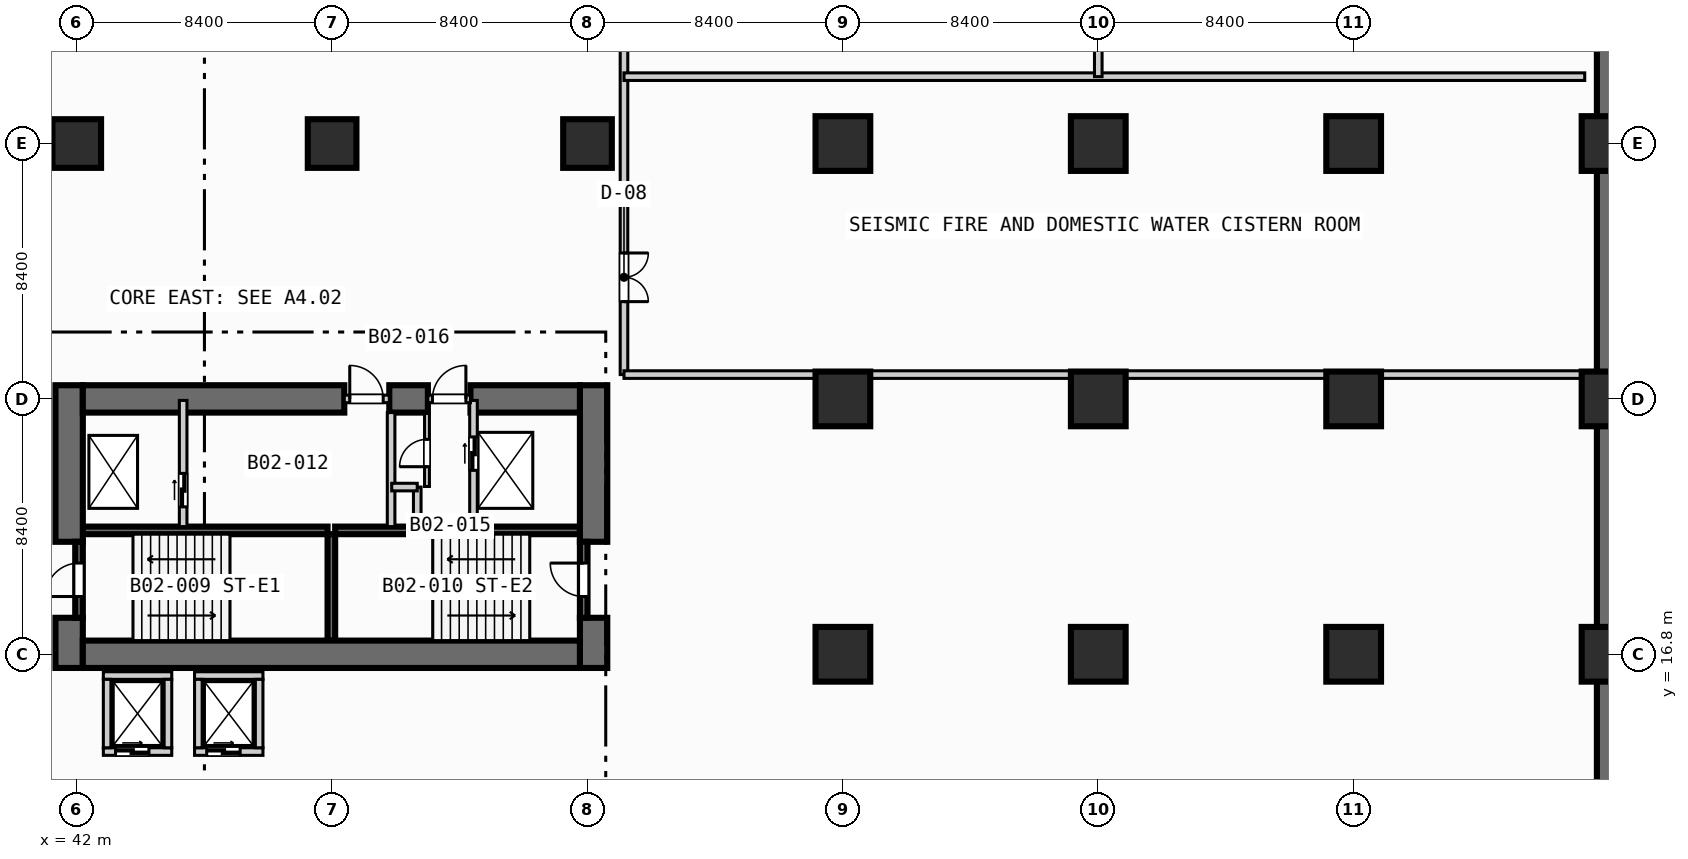
"""IFC4 building model, lengths in metres.
Left out: names, types, materials, properties, quantities, classifications, styles, units other than length and angle.
Written with IfcOpenShell. Run it as: python <this file> out.ifc"""

import sys

from ifc_helpers import new_model, si_unit, direction, frame, frame_2d, origin, origin_2d, place, context, subcontext, project, spatial, rectangle, extrude, element, fill, save


model = new_model("IFC4")
c1 = context("Model", 3, precision=1e-05, world=origin(), true_north=direction((0.0, 1.0)))
c2 = subcontext(c1, "Body", "Model", "MODEL_VIEW")
j1 = project(units=[si_unit("LENGTHUNIT", "METRE"), si_unit("PLANEANGLEUNIT", "RADIAN")], contexts=[c1])
p1 = place(None, origin())
s1 = spatial("IfcSite", under=j1, at=p1, CompositionType="ELEMENT")
p2 = place(p1, origin())
s2 = spatial("IfcBuilding", under=s1, at=p2, CompositionType="ELEMENT")
p3 = place(p2, frame((0.0, 0.0, -8.4)))
s3 = spatial("IfcBuildingStorey", under=s2, at=p3, CompositionType="ELEMENT", Elevation=-8.4)
p4 = place(p3, frame((92.4, 0.4, 0.0), z_axis=(0.0, 0.0, 1.0), x_axis=(0.0, 1.0, 0.0)))
e1 = element("IfcWall", 1, at=p4, inside=s3, PredefinedType="USERDEFINED", context=c2, shape_type="SweptSolid", body=[
    extrude(rectangle(XDim=91.6, YDim=0.8, at=frame_2d((45.8, 0.0))), origin(), (0.0, 0.0, 1.0), 3.85),
])
for number, where, z_axis, x_axis in (
    (2, (42.2, 20.875, 0.0), (0.0, 0.0, 1.0), (1.0, 0.0, 0.0)),
    (3, (50.5, 20.875, 0.0), (0.0, 0.0, 1.0), (1.0, 0.0, 0.0)),
):
    element("IfcWall", number, at=place(p3, frame(where, z_axis=z_axis, x_axis=x_axis)), inside=s3, PredefinedType="SOLIDWALL", context=c2, shape_type="SweptSolid", body=[
        extrude(rectangle(XDim=8.05, YDim=0.25, at=frame_2d((4.025, 0.0))), origin(), (0.0, 0.0, 1.0), 3.85),
    ])
p5 = place(p3, frame((50.375, 17.25, 0.0), z_axis=(0.0, 0.0, 1.0), x_axis=(0.0, 1.0, 0.0)))
e4 = element("IfcWall", 4, at=p5, inside=s3, PredefinedType="SOLIDWALL", context=c2, shape_type="SweptSolid", body=[
    extrude(rectangle(XDim=3.5, YDim=0.25, at=frame_2d((1.75, 0.0))), origin(), (0.0, 0.0, 1.0), 3.85),
])
p6 = place(p3, frame((41.75, 16.35, 0.0), z_axis=(0.0, 0.0, 1.0), x_axis=(0.0, 1.0, 0.0)))
e5 = element("IfcWall", 5, at=p6, inside=s3, PredefinedType="SHEAR", context=c2, shape_type="SweptSolid", body=[
    extrude(rectangle(XDim=1.65, YDim=0.9, at=frame_2d((0.825, 0.0))), origin(), (0.0, 0.0, 1.0), 3.85),
])
p7 = place(p3, frame((41.75, 20.5, 0.0), z_axis=(0.0, 0.0, 1.0), x_axis=(0.0, 1.0, 0.0)))
e6 = element("IfcWall", 6, at=p7, inside=s3, PredefinedType="SHEAR", context=c2, shape_type="SweptSolid", body=[
    extrude(rectangle(XDim=5.15, YDim=0.9, at=frame_2d((2.575, 0.0))), origin(), (0.0, 0.0, 1.0), 3.85),
])
p8 = place(p3, frame((59.0, 16.35, 0.0), z_axis=(0.0, 0.0, 1.0), x_axis=(0.0, 1.0, 0.0)))
e7 = element("IfcWall", 7, at=p8, inside=s3, PredefinedType="SHEAR", context=c2, shape_type="SweptSolid", body=[
    extrude(rectangle(XDim=1.65, YDim=0.9, at=frame_2d((0.825, 0.0))), origin(), (0.0, 0.0, 1.0), 3.85),
])
p9 = place(p3, frame((59.0, 20.5, 0.0), z_axis=(0.0, 0.0, 1.0), x_axis=(0.0, 1.0, 0.0)))
e8 = element("IfcWall", 8, at=p9, inside=s3, PredefinedType="SHEAR", context=c2, shape_type="SweptSolid", body=[
    extrude(rectangle(XDim=5.15, YDim=0.9, at=frame_2d((2.575, 0.0))), origin(), (0.0, 0.0, 1.0), 3.85),
])
p10 = place(p3, frame((42.2, 16.8, 0.0), z_axis=(0.0, 0.0, 1.0), x_axis=(1.0, 0.0, 0.0)))
e9 = element("IfcWall", 9, at=p10, inside=s3, PredefinedType="SHEAR", context=c2, shape_type="SweptSolid", body=[
    extrude(rectangle(XDim=16.35, YDim=0.9, at=frame_2d((8.175, 0.0))), origin(), (0.0, 0.0, 1.0), 3.85),
])
p11 = place(p3, frame((42.2, 25.2, 0.0), z_axis=(0.0, 0.0, 1.0), x_axis=(1.0, 0.0, 0.0)))
e10 = element("IfcWall", 10, at=p11, inside=s3, PredefinedType="SHEAR", context=c2, shape_type="SweptSolid", body=[
    extrude(rectangle(XDim=8.6, YDim=0.9, at=frame_2d((4.3, 0.0))), origin(), (0.0, 0.0, 1.0), 3.85),
])
p12 = place(p3, frame((52.28, 25.2, 0.0), z_axis=(0.0, 0.0, 1.0), x_axis=(1.0, 0.0, 0.0)))
e11 = element("IfcWall", 11, at=p12, inside=s3, PredefinedType="SHEAR", context=c2, shape_type="SweptSolid", body=[
    extrude(rectangle(XDim=1.27, YDim=0.9, at=frame_2d((0.635, 0.0))), origin(), (0.0, 0.0, 1.0), 3.85),
])
p13 = place(p3, frame((54.95, 25.2, 0.0), z_axis=(0.0, 0.0, 1.0), x_axis=(1.0, 0.0, 0.0)))
e12 = element("IfcWall", 12, at=p13, inside=s3, PredefinedType="SHEAR", context=c2, shape_type="SweptSolid", body=[
    extrude(rectangle(XDim=3.6, YDim=0.9, at=frame_2d((1.8, 0.0))), origin(), (0.0, 0.0, 1.0), 3.85),
])
for number, where, z_axis, x_axis in (
    (13, (42.0, 33.6, 0.0), (0.0, 0.0, 1.0), (1.0, 0.0, 0.0)),
    (14, (50.4, 33.6, 0.0), (0.0, 0.0, 1.0), (1.0, 0.0, 0.0)),
    (15, (58.8, 33.6, 0.0), (0.0, 0.0, 1.0), (1.0, 0.0, 0.0)),
):
    element("IfcColumn", number, at=place(p3, frame(where, z_axis=z_axis, x_axis=x_axis)), inside=s3, PredefinedType="COLUMN", context=c2, shape_type="SweptSolid", body=[
        extrude(rectangle(XDim=1.6, YDim=1.6, at=origin_2d()), origin(), (0.0, 0.0, 1.0), 4.2),
    ])
for number, where, z_axis, x_axis in (
    (16, (67.2, 16.8, 0.0), (0.0, 0.0, 1.0), (1.0, 0.0, 0.0)),
    (17, (67.2, 25.2, 0.0), (0.0, 0.0, 1.0), (1.0, 0.0, 0.0)),
    (18, (67.2, 33.6, 0.0), (0.0, 0.0, 1.0), (1.0, 0.0, 0.0)),
    (19, (75.6, 16.8, 0.0), (0.0, 0.0, 1.0), (1.0, 0.0, 0.0)),
    (20, (75.6, 25.2, 0.0), (0.0, 0.0, 1.0), (1.0, 0.0, 0.0)),
    (21, (75.6, 33.6, 0.0), (0.0, 0.0, 1.0), (1.0, 0.0, 0.0)),
    (22, (84.0, 16.8, 0.0), (0.0, 0.0, 1.0), (1.0, 0.0, 0.0)),
    (23, (84.0, 25.2, 0.0), (0.0, 0.0, 1.0), (1.0, 0.0, 0.0)),
    (24, (84.0, 33.6, 0.0), (0.0, 0.0, 1.0), (1.0, 0.0, 0.0)),
    (25, (92.4, 16.8, 0.0), (0.0, 0.0, 1.0), (1.0, 0.0, 0.0)),
    (26, (92.4, 25.2, 0.0), (0.0, 0.0, 1.0), (1.0, 0.0, 0.0)),
    (27, (92.4, 33.6, 0.0), (0.0, 0.0, 1.0), (1.0, 0.0, 0.0)),
):
    element("IfcColumn", number, at=place(p3, frame(where, z_axis=z_axis, x_axis=x_axis)), inside=s3, PredefinedType="COLUMN", context=c2, shape_type="SweptSolid", body=[
        extrude(rectangle(XDim=1.8, YDim=1.8, at=origin_2d()), origin(), (0.0, 0.0, 1.0), 4.2),
    ])
p14 = place(p3, frame((42.075, 18.0, 0.0), z_axis=(0.0, 0.0, 1.0), x_axis=(0.0, 1.0, 0.0)))
e28 = element("IfcWall", 28, at=p14, inside=s3, PredefinedType="SOLIDWALL", context=c2, shape_type="SweptSolid", body=[
    extrude(rectangle(XDim=2.5, YDim=0.25, at=frame_2d((1.25, 0.0))), origin(), (0.0, 0.0, 1.0), 3.85),
])
p15 = place(p14, frame((0.7, 0.0, 0.0)))
e29 = element("IfcOpeningElement", 29, at=p15, cuts=e28, PredefinedType="OPENING", context=c2, shape_type="SweptSolid", body=[
    extrude(rectangle(XDim=1.1, YDim=2.15, at=frame_2d((0.55, 1.075))), frame((0.0, 0.135, 0.0), z_axis=(0.0, -1.0, 0.0), x_axis=(1.0, 0.0, 0.0)), (0.0, 0.0, 1.0), 0.27),
])
p16 = place(p3, frame((58.675, 18.0, 0.0), z_axis=(0.0, 0.0, 1.0), x_axis=(0.0, 1.0, 0.0)))
e30 = element("IfcWall", 30, at=p16, inside=s3, PredefinedType="SOLIDWALL", context=c2, shape_type="SweptSolid", body=[
    extrude(rectangle(XDim=2.5, YDim=0.25, at=frame_2d((1.25, 0.0))), origin(), (0.0, 0.0, 1.0), 3.85),
])
p17 = place(p16, frame((0.7, 0.0, 0.0)))
e31 = element("IfcOpeningElement", 31, at=p17, cuts=e30, PredefinedType="OPENING", context=c2, shape_type="SweptSolid", body=[
    extrude(rectangle(XDim=1.1, YDim=2.15, at=frame_2d((0.55, 1.075))), frame((0.0, 0.135, 0.0), z_axis=(0.0, -1.0, 0.0), x_axis=(1.0, 0.0, 0.0)), (0.0, 0.0, 1.0), 0.27),
])
p18 = place(p3, frame((45.5, 21.0, 0.0), z_axis=(0.0, 0.0, 1.0), x_axis=(0.0, 1.0, 0.0)))
e32 = element("IfcWall", 32, at=p18, inside=s3, PredefinedType="SOLIDWALL", context=c2, shape_type="SweptSolid", body=[
    extrude(rectangle(XDim=4.15, YDim=0.25, at=frame_2d((2.075, 0.0))), origin(), (0.0, 0.0, 1.0), 3.85),
])
p19 = place(p18, frame((0.65, 0.0, 0.0)))
e33 = element("IfcOpeningElement", 33, at=p19, cuts=e32, PredefinedType="OPENING", context=c2, shape_type="SweptSolid", body=[
    extrude(rectangle(XDim=1.1, YDim=2.15, at=frame_2d((0.55, 1.075))), frame((0.0, 0.135, 0.0), z_axis=(0.0, -1.0, 0.0), x_axis=(1.0, 0.0, 0.0)), (0.0, 0.0, 1.0), 0.27),
])
p20 = place(p3, frame((50.8, 25.2, 0.0), z_axis=(0.0, 0.0, 1.0), x_axis=(1.0, 0.0, 0.0)))
e34 = element("IfcWall", 34, at=p20, inside=s3, PredefinedType="SOLIDWALL", context=c2, shape_type="SweptSolid", body=[
    extrude(rectangle(XDim=1.48, YDim=0.25, at=frame_2d((0.74, 0.0))), origin(), (0.0, 0.0, 1.0), 3.85),
])
p21 = place(p20, frame((0.18, 0.0, 0.0)))
e35 = element("IfcOpeningElement", 35, at=p21, cuts=e34, PredefinedType="OPENING", context=c2, shape_type="SweptSolid", body=[
    extrude(rectangle(XDim=1.1, YDim=2.15, at=frame_2d((0.55, 1.075))), frame((0.0, 0.135, 0.0), z_axis=(0.0, -1.0, 0.0), x_axis=(1.0, 0.0, 0.0)), (0.0, 0.0, 1.0), 0.27),
])
p22 = place(p3, frame((52.34, 21.0, 0.0), z_axis=(0.0, 0.0, 1.0), x_axis=(0.0, 1.0, 0.0)))
e36 = element("IfcWall", 36, at=p22, inside=s3, PredefinedType="SOLIDWALL", context=c2, shape_type="SweptSolid", body=[
    extrude(rectangle(XDim=3.75, YDim=0.25, at=frame_2d((1.875, 0.0))), origin(), (0.0, 0.0, 1.0), 3.85),
])
p23 = place(p3, frame((55.05, 21.0, 0.0), z_axis=(0.0, 0.0, 1.0), x_axis=(0.0, 1.0, 0.0)))
e37 = element("IfcWall", 37, at=p23, inside=s3, PredefinedType="SOLIDWALL", context=c2, shape_type="SweptSolid", body=[
    extrude(rectangle(XDim=4.15, YDim=0.25, at=frame_2d((2.075, 0.0))), origin(), (0.0, 0.0, 1.0), 3.85),
])
p24 = place(p23, frame((1.85, 0.0, 0.0)))
e38 = element("IfcOpeningElement", 38, at=p24, cuts=e37, PredefinedType="OPENING", context=c2, shape_type="SweptSolid", body=[
    extrude(rectangle(XDim=1.1, YDim=2.15, at=frame_2d((0.55, 1.075))), frame((0.0, 0.135, 0.0), z_axis=(0.0, -1.0, 0.0), x_axis=(1.0, 0.0, 0.0)), (0.0, 0.0, 1.0), 0.27),
])
p25 = place(p3, frame((53.55, 25.2, 0.0), z_axis=(0.0, 0.0, 1.0), x_axis=(1.0, 0.0, 0.0)))
e39 = element("IfcWall", 39, at=p25, inside=s3, PredefinedType="SOLIDWALL", context=c2, shape_type="SweptSolid", body=[
    extrude(rectangle(XDim=1.4, YDim=0.25, at=frame_2d((0.7, 0.0))), origin(), (0.0, 0.0, 1.0), 3.85),
])
p26 = place(p25, frame((0.15, 0.0, 0.0)))
e40 = element("IfcOpeningElement", 40, at=p26, cuts=e39, PredefinedType="OPENING", context=c2, shape_type="SweptSolid", body=[
    extrude(rectangle(XDim=1.1, YDim=2.15, at=frame_2d((0.55, 1.075))), frame((0.0, 0.135, 0.0), z_axis=(0.0, -1.0, 0.0), x_axis=(1.0, 0.0, 0.0)), (0.0, 0.0, 1.0), 0.27),
])
p27 = place(p3, frame((53.2, 21.0, 0.0), z_axis=(0.0, 0.0, 1.0), x_axis=(0.0, 1.0, 0.0)))
e41 = element("IfcWall", 41, at=p27, inside=s3, PredefinedType="SOLIDWALL", context=c2, shape_type="SweptSolid", body=[
    extrude(rectangle(XDim=1.3, YDim=0.25, at=frame_2d((0.65, 0.0))), origin(), (0.0, 0.0, 1.0), 3.85),
])
p28 = place(p3, frame((52.36, 22.3, 0.0), z_axis=(0.0, 0.0, 1.0), x_axis=(1.0, 0.0, 0.0)))
e42 = element("IfcWall", 42, at=p28, inside=s3, PredefinedType="SOLIDWALL", context=c2, shape_type="SweptSolid", body=[
    extrude(rectangle(XDim=0.84, YDim=0.25, at=frame_2d((0.42, 0.0))), origin(), (0.0, 0.0, 1.0), 3.85),
])
p29 = place(p3, frame((53.52, 22.32, 0.0), z_axis=(0.0, 0.0, 1.0), x_axis=(0.0, 1.0, 0.0)))
e43 = element("IfcWall", 43, at=p29, inside=s3, PredefinedType="PARTITIONING", context=c2, shape_type="SweptSolid", body=[
    extrude(rectangle(XDim=2.4, YDim=0.16, at=frame_2d((1.2, 0.0))), origin(), (0.0, 0.0, 1.0), 3.85),
])
p30 = place(p29, frame((0.65, 0.0, 0.0)))
e44 = element("IfcOpeningElement", 44, at=p30, cuts=e43, PredefinedType="OPENING", context=c2, shape_type="SweptSolid", body=[
    extrude(rectangle(XDim=0.9, YDim=2.1, at=frame_2d((0.45, 1.05))), frame((0.0, 0.09, 0.0), z_axis=(0.0, -1.0, 0.0), x_axis=(1.0, 0.0, 0.0)), (0.0, 0.0, 1.0), 0.18),
])
p31 = place(p3, frame((42.875, 13.6, 0.0), z_axis=(0.0, 0.0, 1.0), x_axis=(1.0, 0.0, 0.0)))
e45 = element("IfcWall", 45, at=p31, inside=s3, PredefinedType="SOLIDWALL", context=c2, shape_type="SweptSolid", body=[
    extrude(rectangle(XDim=2.25, YDim=0.25, at=frame_2d((1.125, 0.0))), origin(), (0.0, 0.0, 1.0), 3.85),
])
p32 = place(p31, frame((0.4, 0.0, 0.0)))
e46 = element("IfcOpeningElement", 46, at=p32, cuts=e45, PredefinedType="OPENING", context=c2, shape_type="SweptSolid", body=[
    extrude(rectangle(XDim=1.1, YDim=2.15, at=frame_2d((0.55, 1.075))), frame((0.0, 0.135, 0.0), z_axis=(0.0, -1.0, 0.0), x_axis=(1.0, 0.0, 0.0)), (0.0, 0.0, 1.0), 0.27),
])
for number, where, z_axis, x_axis in (
    (47, (42.875, 16.1, 0.0), (0.0, 0.0, 1.0), (1.0, 0.0, 0.0)),
    (48, (43.0, 13.725, 0.0), (0.0, 0.0, 1.0), (0.0, 1.0, 0.0)),
    (49, (45.0, 13.725, 0.0), (0.0, 0.0, 1.0), (0.0, 1.0, 0.0)),
):
    element("IfcWall", number, at=place(p3, frame(where, z_axis=z_axis, x_axis=x_axis)), inside=s3, PredefinedType="SOLIDWALL", context=c2, shape_type="SweptSolid", body=[
        extrude(rectangle(XDim=2.25, YDim=0.25, at=frame_2d((1.125, 0.0))), origin(), (0.0, 0.0, 1.0), 3.85),
    ])
p33 = place(p3, frame((45.875, 13.6, 0.0), z_axis=(0.0, 0.0, 1.0), x_axis=(1.0, 0.0, 0.0)))
e50 = element("IfcWall", 50, at=p33, inside=s3, PredefinedType="SOLIDWALL", context=c2, shape_type="SweptSolid", body=[
    extrude(rectangle(XDim=2.25, YDim=0.25, at=frame_2d((1.125, 0.0))), origin(), (0.0, 0.0, 1.0), 3.85),
])
p34 = place(p33, frame((0.4, 0.0, 0.0)))
e51 = element("IfcOpeningElement", 51, at=p34, cuts=e50, PredefinedType="OPENING", context=c2, shape_type="SweptSolid", body=[
    extrude(rectangle(XDim=1.1, YDim=2.15, at=frame_2d((0.55, 1.075))), frame((0.0, 0.135, 0.0), z_axis=(0.0, -1.0, 0.0), x_axis=(1.0, 0.0, 0.0)), (0.0, 0.0, 1.0), 0.27),
])
for number, where, z_axis, x_axis in (
    (52, (45.875, 16.1, 0.0), (0.0, 0.0, 1.0), (1.0, 0.0, 0.0)),
    (53, (46.0, 13.725, 0.0), (0.0, 0.0, 1.0), (0.0, 1.0, 0.0)),
    (54, (48.0, 13.725, 0.0), (0.0, 0.0, 1.0), (0.0, 1.0, 0.0)),
):
    element("IfcWall", number, at=place(p3, frame(where, z_axis=z_axis, x_axis=x_axis)), inside=s3, PredefinedType="SOLIDWALL", context=c2, shape_type="SweptSolid", body=[
        extrude(rectangle(XDim=2.25, YDim=0.25, at=frame_2d((1.125, 0.0))), origin(), (0.0, 0.0, 1.0), 3.85),
    ])
p35 = place(p3, frame((60.0, 26.0, 0.0), z_axis=(0.0, 0.0, 1.0), x_axis=(0.0, 1.0, 0.0)))
e55 = element("IfcWall", 55, at=p35, inside=s3, PredefinedType="SOLIDWALL", context=c2, shape_type="SweptSolid", body=[
    extrude(rectangle(XDim=19.6, YDim=0.25, at=frame_2d((9.8, 0.0))), origin(), (0.0, 0.0, 1.0), 3.85),
])
p36 = place(p35, frame((2.4, 0.0, 0.0)))
e56 = element("IfcOpeningElement", 56, at=p36, cuts=e55, PredefinedType="OPENING", context=c2, shape_type="SweptSolid", body=[
    extrude(rectangle(XDim=1.6, YDim=2.2, at=frame_2d((0.8, 1.1))), frame((0.0, 0.135, 0.0), z_axis=(0.0, -1.0, 0.0), x_axis=(1.0, 0.0, 0.0)), (0.0, 0.0, 1.0), 0.27),
])
p37 = place(p35, frame((17.2, 0.0, 0.0)))
e57 = element("IfcOpeningElement", 57, at=p37, cuts=e55, PredefinedType="OPENING", context=c2, shape_type="SweptSolid", body=[
    extrude(rectangle(XDim=1.6, YDim=2.2, at=frame_2d((0.8, 1.1))), frame((0.0, 0.135, 0.0), z_axis=(0.0, -1.0, 0.0), x_axis=(1.0, 0.0, 0.0)), (0.0, 0.0, 1.0), 0.27),
])
for number, where, z_axis, x_axis in (
    (58, (60.0, 35.8, 0.0), (0.0, 0.0, 1.0), (1.0, 0.0, 0.0)),
    (59, (60.0, 26.0, 0.0), (0.0, 0.0, 1.0), (1.0, 0.0, 0.0)),
):
    element("IfcWall", number, at=place(p3, frame(where, z_axis=z_axis, x_axis=x_axis)), inside=s3, PredefinedType="SOLIDWALL", context=c2, shape_type="SweptSolid", body=[
        extrude(rectangle(XDim=31.6, YDim=0.25, at=frame_2d((15.8, 0.0))), origin(), (0.0, 0.0, 1.0), 3.85),
    ])
p38 = place(p3, frame((75.6, 35.8, 0.0), z_axis=(0.0, 0.0, 1.0), x_axis=(0.0, 1.0, 0.0)))
e60 = element("IfcWall", 60, at=p38, inside=s3, PredefinedType="SOLIDWALL", context=c2, shape_type="SweptSolid", body=[
    extrude(rectangle(XDim=9.8, YDim=0.25, at=frame_2d((4.9, 0.0))), origin(), (0.0, 0.0, 1.0), 3.0),
])
p39 = place(p15, origin())
e61 = element("IfcDoor", 61, at=p39, inside=s3, OperationType="SINGLE_SWING_LEFT", PredefinedType="DOOR", context=c2, shape_type="SweptSolid", body=[
    extrude(rectangle(XDim=1.1, YDim=2.15, at=frame_2d((0.55, 1.075))), frame((0.0, 0.025, 0.0), z_axis=(0.0, -1.0, 0.0), x_axis=(1.0, 0.0, 0.0)), (0.0, 0.0, 1.0), 0.05),
])
fill(e29, e61)
p40 = place(p17, origin())
e62 = element("IfcDoor", 62, at=p40, inside=s3, OperationType="SINGLE_SWING_RIGHT", PredefinedType="DOOR", context=c2, shape_type="SweptSolid", body=[
    extrude(rectangle(XDim=1.1, YDim=2.15, at=frame_2d((0.55, 1.075))), frame((0.0, 0.025, 0.0), z_axis=(0.0, -1.0, 0.0), x_axis=(1.0, 0.0, 0.0)), (0.0, 0.0, 1.0), 0.05),
])
fill(e31, e62)
p41 = place(p19, origin())
e63 = element("IfcDoor", 63, at=p41, inside=s3, OperationType="SLIDING_TO_LEFT", PredefinedType="DOOR", context=c2, shape_type="SweptSolid", body=[
    extrude(rectangle(XDim=1.1, YDim=2.15, at=frame_2d((0.55, 1.075))), frame((0.0, 0.025, 0.0), z_axis=(0.0, -1.0, 0.0), x_axis=(1.0, 0.0, 0.0)), (0.0, 0.0, 1.0), 0.05),
])
fill(e33, e63)
p42 = place(p21, origin())
e64 = element("IfcDoor", 64, at=p42, inside=s3, OperationType="SINGLE_SWING_LEFT", PredefinedType="DOOR", context=c2, shape_type="SweptSolid", body=[
    extrude(rectangle(XDim=1.1, YDim=2.15, at=frame_2d((0.55, 1.075))), frame((0.0, 0.025, 0.0), z_axis=(0.0, -1.0, 0.0), x_axis=(1.0, 0.0, 0.0)), (0.0, 0.0, 1.0), 0.05),
])
fill(e35, e64)
p43 = place(p24, origin())
e65 = element("IfcDoor", 65, at=p43, inside=s3, OperationType="SLIDING_TO_LEFT", PredefinedType="DOOR", context=c2, shape_type="SweptSolid", body=[
    extrude(rectangle(XDim=1.1, YDim=2.15, at=frame_2d((0.55, 1.075))), frame((0.0, 0.025, 0.0), z_axis=(0.0, -1.0, 0.0), x_axis=(1.0, 0.0, 0.0)), (0.0, 0.0, 1.0), 0.05),
])
fill(e38, e65)
p44 = place(p26, origin())
e66 = element("IfcDoor", 66, at=p44, inside=s3, OperationType="SINGLE_SWING_RIGHT", PredefinedType="DOOR", context=c2, shape_type="SweptSolid", body=[
    extrude(rectangle(XDim=1.1, YDim=2.15, at=frame_2d((0.55, 1.075))), frame((0.0, 0.025, 0.0), z_axis=(0.0, -1.0, 0.0), x_axis=(1.0, 0.0, 0.0)), (0.0, 0.0, 1.0), 0.05),
])
fill(e40, e66)
p45 = place(p30, origin())
e67 = element("IfcDoor", 67, at=p45, inside=s3, OperationType="SINGLE_SWING_LEFT", PredefinedType="DOOR", context=c2, shape_type="SweptSolid", body=[
    extrude(rectangle(XDim=0.9, YDim=2.1, at=frame_2d((0.45, 1.05))), frame((0.0, 0.025, 0.0), z_axis=(0.0, -1.0, 0.0), x_axis=(1.0, 0.0, 0.0)), (0.0, 0.0, 1.0), 0.05),
])
fill(e44, e67)
p46 = place(p32, origin())
e68 = element("IfcDoor", 68, at=p46, inside=s3, OperationType="SLIDING_TO_LEFT", PredefinedType="DOOR", context=c2, shape_type="SweptSolid", body=[
    extrude(rectangle(XDim=1.1, YDim=2.15, at=frame_2d((0.55, 1.075))), frame((0.0, 0.025, 0.0), z_axis=(0.0, -1.0, 0.0), x_axis=(1.0, 0.0, 0.0)), (0.0, 0.0, 1.0), 0.05),
])
fill(e46, e68)
p47 = place(p34, origin())
e69 = element("IfcDoor", 69, at=p47, inside=s3, OperationType="SLIDING_TO_LEFT", PredefinedType="DOOR", context=c2, shape_type="SweptSolid", body=[
    extrude(rectangle(XDim=1.1, YDim=2.15, at=frame_2d((0.55, 1.075))), frame((0.0, 0.025, 0.0), z_axis=(0.0, -1.0, 0.0), x_axis=(1.0, 0.0, 0.0)), (0.0, 0.0, 1.0), 0.05),
])
fill(e51, e69)
p48 = place(p36, origin())
e70 = element("IfcDoor", 70, at=p48, inside=s3, OperationType="SINGLE_SWING_RIGHT", PredefinedType="DOOR", context=c2, shape_type="SweptSolid", body=[
    extrude(rectangle(XDim=1.6, YDim=2.2, at=frame_2d((0.8, 1.1))), frame((0.0, 0.025, 0.0), z_axis=(0.0, -1.0, 0.0), x_axis=(1.0, 0.0, 0.0)), (0.0, 0.0, 1.0), 0.05),
])
fill(e56, e70)
save(model, sys.argv[1])
